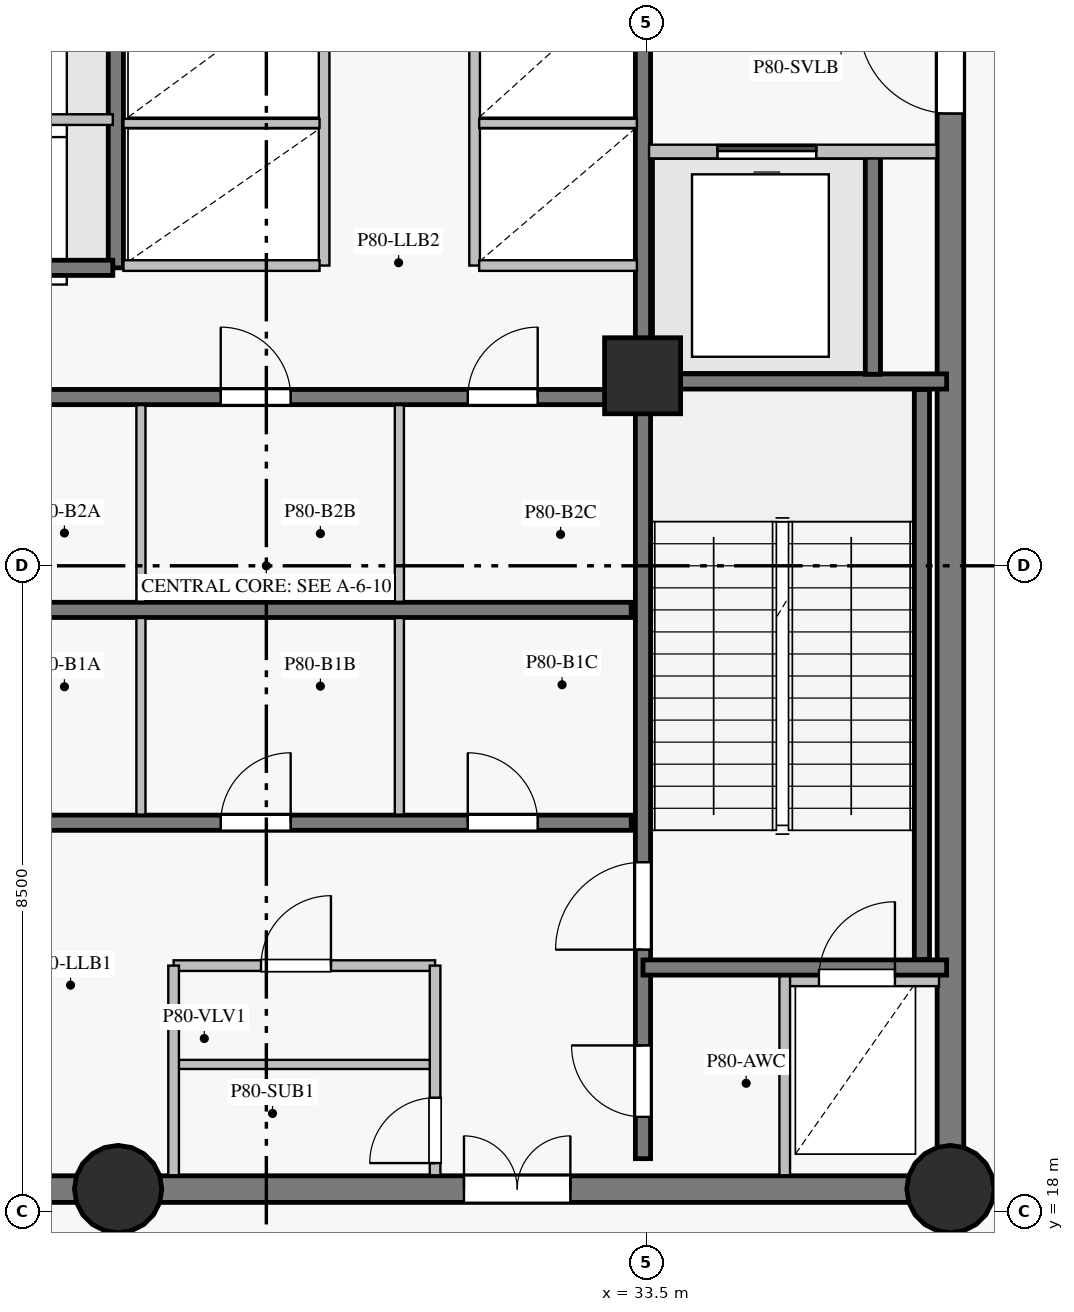
"""IFC4 building model, lengths in metres.
Left out: names, types, materials, properties, quantities, classifications, styles, units other than length and angle.
Written with IfcOpenShell. Run it as: python <this file> out.ifc"""

import sys

from ifc_helpers import new_model, si_unit, direction, frame, frame_2d, origin, origin_with_axes, origin_2d, place, context, subcontext, project, spatial, rectangle, circle, extrude, source, transform, mapped, element, fill, save


model = new_model("IFC4")
c1 = context("Model", 3, precision=1e-05, world=origin(), true_north=direction((0.0, 1.0)))
c2 = subcontext(c1, "Body", "Model", "MODEL_VIEW")
j1 = project(units=[si_unit("LENGTHUNIT", "METRE"), si_unit("PLANEANGLEUNIT", "RADIAN")], contexts=[c1])
p1 = place(None, origin())
s1 = spatial("IfcSite", under=j1, at=p1, CompositionType="ELEMENT")
p2 = place(p1, origin())
s2 = spatial("IfcBuilding", under=s1, at=p2, CompositionType="ELEMENT")
p3 = place(p2, frame((0.0, 0.0, 268.75)))
s3 = spatial("IfcBuildingStorey", under=s2, at=p3, CompositionType="ELEMENT", Elevation=268.75)
p4 = place(p3, frame((19.5, 18.3, 0.0), z_axis=(0.0, 0.0, 1.0), x_axis=(1.0, 0.0, 0.0)))
e1 = element("IfcWall", 1, at=p4, inside=s3, PredefinedType="SHEAR", context=c2, shape_type="SweptSolid", body=[
    extrude(rectangle(XDim=7.05, YDim=0.35, at=frame_2d((3.525, 0.0))), origin(), (0.0, 0.0, 1.0), 4.375),
])
p5 = place(p4, frame((4.2, 0.0, 0.0)))
e2 = element("IfcOpeningElement", 2, at=p5, cuts=e1, PredefinedType="OPENING", context=c2, shape_type="SweptSolid", body=[
    extrude(rectangle(XDim=1.4, YDim=2.2, at=frame_2d((0.7, 1.1))), frame((0.0, 0.185, 0.0), z_axis=(0.0, -1.0, 0.0), x_axis=(1.0, 0.0, 0.0)), (0.0, 0.0, 1.0), 0.37),
])
p6 = place(p3, frame((26.55, 18.3, 0.0), z_axis=(0.0, 0.0, 1.0), x_axis=(1.0, 0.0, 0.0)))
e3 = element("IfcWall", 3, at=p6, inside=s3, PredefinedType="SHEAR", context=c2, shape_type="SweptSolid", body=[
    extrude(rectangle(XDim=10.95, YDim=0.35, at=frame_2d((5.475, 0.0))), origin(), (0.0, 0.0, 1.0), 4.375),
])
p7 = place(p6, frame((4.55, 0.0, 0.0)))
e4 = element("IfcOpeningElement", 4, at=p7, cuts=e3, PredefinedType="OPENING", context=c2, shape_type="SweptSolid", body=[
    extrude(rectangle(XDim=1.4, YDim=2.2, at=frame_2d((0.7, 1.1))), frame((0.0, 0.185, 0.0), z_axis=(0.0, -1.0, 0.0), x_axis=(1.0, 0.0, 0.0)), (0.0, 0.0, 1.0), 0.37),
])
p8 = place(p3, frame((37.5, 18.3, 0.0), z_axis=(0.0, 0.0, 1.0), x_axis=(0.0, 1.0, 0.0)))
e5 = element("IfcWall", 5, at=p8, inside=s3, PredefinedType="SHEAR", context=c2, shape_type="SweptSolid", body=[
    extrude(rectangle(XDim=16.4, YDim=0.35, at=frame_2d((8.2, 0.0))), origin(), (0.0, 0.0, 1.0), 4.375),
])
p9 = place(p8, frame((14.15, 0.0, 0.0)))
e6 = element("IfcOpeningElement", 6, at=p9, cuts=e5, PredefinedType="OPENING", context=c2, shape_type="SweptSolid", body=[
    extrude(rectangle(XDim=1.2, YDim=2.15, at=frame_2d((0.6, 1.075))), frame((0.0, 0.185, 0.0), z_axis=(0.0, -1.0, 0.0), x_axis=(1.0, 0.0, 0.0)), (0.0, 0.0, 1.0), 0.37),
])
m1 = source(origin_with_axes(), c2, "Body", "SweptSolid", [
    extrude(circle(Radius=0.575, at=origin_2d()), origin(), (0.0, 0.0, 1.0), 4.65),
])
for number, where, z_axis, x_axis in (
    (7, (26.55, 18.3, 0.0), (0.0, 0.0, 1.0), (1.0, 0.0, 0.0)),
    (8, (37.5, 18.3, 0.0), (0.0, 0.0, 1.0), (1.0, 0.0, 0.0)),
):
    element("IfcColumn", number, at=place(p3, frame(where, z_axis=z_axis, x_axis=x_axis)), inside=s3, PredefinedType="COLUMN", context=c2, shape_type="MappedRepresentation", body=[
        mapped(m1, transform((0.0, 0.0, 0.0), scale=1.0)),
    ])
m2 = source(origin_with_axes(), c2, "Body", "SweptSolid", [
    extrude(rectangle(XDim=1.0, YDim=1.0, at=origin_2d()), origin(), (0.0, 0.0, 1.0), 4.65),
])
p10 = place(p3, frame((33.45, 29.0, 0.0), z_axis=(0.0, 0.0, 1.0), x_axis=(1.0, 0.0, 0.0)))
e9 = element("IfcColumn", 9, at=p10, inside=s3, PredefinedType="COLUMN", context=c2, shape_type="MappedRepresentation", body=[
    mapped(m2, transform((0.0, 0.0, 0.0), scale=1.0)),
])
p11 = place(p3, frame((35.32, 21.08, 0.0), z_axis=(0.0, 0.0, 1.0), x_axis=(1.0, 0.0, 0.0)))
e10 = element("IfcWall", 10, at=p11, inside=s3, PredefinedType="SHEAR", context=c2, shape_type="SweptSolid", body=[
    extrude(rectangle(XDim=2.03, YDim=0.22, at=frame_2d((1.015, 0.0))), origin(), (0.0, 0.0, 1.0), 2.45),
])
p12 = place(p11, frame((0.45, 0.0, 0.0)))
e11 = element("IfcOpeningElement", 11, at=p12, cuts=e10, PredefinedType="OPENING", context=c2, shape_type="SweptSolid", body=[
    extrude(rectangle(XDim=1.0, YDim=2.05, at=frame_2d((0.5, 1.025))), frame((0.0, 0.12, 0.0), z_axis=(0.0, -1.0, 0.0), x_axis=(1.0, 0.0, 0.0)), (0.0, 0.0, 1.0), 0.24),
])
p13 = place(p3, frame((33.455, 18.7, 0.0), z_axis=(0.0, 0.0, 1.0), x_axis=(0.0, 1.0, 0.0)))
e12 = element("IfcWall", 12, at=p13, inside=s3, PredefinedType="SHEAR", context=c2, shape_type="SweptSolid", body=[
    extrude(rectangle(XDim=15.6, YDim=0.2, at=frame_2d((7.8, 0.0))), origin(), (0.0, 0.0, 1.0), 4.375),
])
p14 = place(p13, frame((2.75, 0.0, 0.0)))
e13 = element("IfcOpeningElement", 13, at=p14, cuts=e12, PredefinedType="OPENING", context=c2, shape_type="SweptSolid", body=[
    extrude(rectangle(XDim=1.15, YDim=2.15, at=frame_2d((0.575, 1.075))), frame((0.0, 0.11, 0.0), z_axis=(0.0, -1.0, 0.0), x_axis=(1.0, 0.0, 0.0)), (0.0, 0.0, 1.0), 0.22),
])
p15 = place(p13, frame((0.55, 0.0, 0.0)))
e14 = element("IfcOpeningElement", 14, at=p15, cuts=e12, PredefinedType="OPENING", context=c2, shape_type="SweptSolid", body=[
    extrude(rectangle(XDim=0.94, YDim=2.1, at=frame_2d((0.47, 1.05))), frame((0.0, 0.11, 0.0), z_axis=(0.0, -1.0, 0.0), x_axis=(1.0, 0.0, 0.0)), (0.0, 0.0, 1.0), 0.22),
])
p16 = place(p3, frame((23.7, 23.12, 0.0), z_axis=(0.0, 0.0, 1.0), x_axis=(1.0, 0.0, 0.0)))
e15 = element("IfcWall", 15, at=p16, inside=s3, PredefinedType="SHEAR", context=c2, shape_type="SweptSolid", body=[
    extrude(rectangle(XDim=9.6, YDim=0.2, at=frame_2d((4.8, 0.0))), origin(), (0.0, 0.0, 1.0), 4.375),
])
p17 = place(p16, frame((0.7, 0.0, 0.0)))
e16 = element("IfcOpeningElement", 16, at=p17, cuts=e15, PredefinedType="OPENING", context=c2, shape_type="SweptSolid", body=[
    extrude(rectangle(XDim=0.92, YDim=2.1, at=frame_2d((0.46, 1.05))), frame((0.0, 0.11, 0.0), z_axis=(0.0, -1.0, 0.0), x_axis=(1.0, 0.0, 0.0)), (0.0, 0.0, 1.0), 0.22),
])
p18 = place(p16, frame((4.2, 0.0, 0.0)))
e17 = element("IfcOpeningElement", 17, at=p18, cuts=e15, PredefinedType="OPENING", context=c2, shape_type="SweptSolid", body=[
    extrude(rectangle(XDim=0.92, YDim=2.1, at=frame_2d((0.46, 1.05))), frame((0.0, 0.11, 0.0), z_axis=(0.0, -1.0, 0.0), x_axis=(1.0, 0.0, 0.0)), (0.0, 0.0, 1.0), 0.22),
])
p19 = place(p16, frame((7.45, 0.0, 0.0)))
e18 = element("IfcOpeningElement", 18, at=p19, cuts=e15, PredefinedType="OPENING", context=c2, shape_type="SweptSolid", body=[
    extrude(rectangle(XDim=0.92, YDim=2.1, at=frame_2d((0.46, 1.05))), frame((0.0, 0.11, 0.0), z_axis=(0.0, -1.0, 0.0), x_axis=(1.0, 0.0, 0.0)), (0.0, 0.0, 1.0), 0.22),
])
p20 = place(p3, frame((23.7, 25.92, 0.0), z_axis=(0.0, 0.0, 1.0), x_axis=(1.0, 0.0, 0.0)))
e19 = element("IfcWall", 19, at=p20, inside=s3, PredefinedType="SHEAR", context=c2, shape_type="SweptSolid", body=[
    extrude(rectangle(XDim=9.6, YDim=0.2, at=frame_2d((4.8, 0.0))), origin(), (0.0, 0.0, 1.0), 4.375),
])
p21 = place(p3, frame((23.7, 28.72, 0.0), z_axis=(0.0, 0.0, 1.0), x_axis=(1.0, 0.0, 0.0)))
e20 = element("IfcWall", 20, at=p21, inside=s3, PredefinedType="SHEAR", context=c2, shape_type="SweptSolid", body=[
    extrude(rectangle(XDim=9.6, YDim=0.2, at=frame_2d((4.8, 0.0))), origin(), (0.0, 0.0, 1.0), 4.375),
])
p22 = place(p21, frame((0.7, 0.0, 0.0)))
e21 = element("IfcOpeningElement", 21, at=p22, cuts=e20, PredefinedType="OPENING", context=c2, shape_type="SweptSolid", body=[
    extrude(rectangle(XDim=0.92, YDim=2.1, at=frame_2d((0.46, 1.05))), frame((0.0, 0.11, 0.0), z_axis=(0.0, -1.0, 0.0), x_axis=(1.0, 0.0, 0.0)), (0.0, 0.0, 1.0), 0.22),
])
p23 = place(p21, frame((4.2, 0.0, 0.0)))
e22 = element("IfcOpeningElement", 22, at=p23, cuts=e20, PredefinedType="OPENING", context=c2, shape_type="SweptSolid", body=[
    extrude(rectangle(XDim=0.92, YDim=2.1, at=frame_2d((0.46, 1.05))), frame((0.0, 0.11, 0.0), z_axis=(0.0, -1.0, 0.0), x_axis=(1.0, 0.0, 0.0)), (0.0, 0.0, 1.0), 0.22),
])
p24 = place(p21, frame((7.45, 0.0, 0.0)))
e23 = element("IfcOpeningElement", 23, at=p24, cuts=e20, PredefinedType="OPENING", context=c2, shape_type="SweptSolid", body=[
    extrude(rectangle(XDim=0.92, YDim=2.1, at=frame_2d((0.46, 1.05))), frame((0.0, 0.11, 0.0), z_axis=(0.0, -1.0, 0.0), x_axis=(1.0, 0.0, 0.0)), (0.0, 0.0, 1.0), 0.22),
])
p25 = place(p3, frame((37.125, 21.32, 0.0), z_axis=(0.0, 0.0, 1.0), x_axis=(0.0, 1.0, 0.0)))
e24 = element("IfcWall", 24, at=p25, inside=s3, PredefinedType="SHEAR", context=c2, shape_type="SweptSolid", body=[
    extrude(rectangle(XDim=7.5, YDim=0.2, at=frame_2d((3.75, 0.0))), origin(), (0.0, 0.0, 1.0), 4.375),
])
for number, where, z_axis, x_axis in (
    (25, (33.455, 21.215, 0.0), (0.0, 0.0, 1.0), (1.0, 0.0, 0.0)),
    (26, (33.455, 28.925, 0.0), (0.0, 0.0, 1.0), (1.0, 0.0, 0.0)),
):
    element("IfcWall", number, at=place(p3, frame(where, z_axis=z_axis, x_axis=x_axis)), inside=s3, PredefinedType="SHEAR", context=c2, shape_type="SweptSolid", body=[
        extrude(rectangle(XDim=3.995, YDim=0.2, at=frame_2d((1.998, 0.0))), origin(), (0.0, 0.0, 1.0), 4.375),
    ])
p26 = place(p3, frame((26.52, 30.42, 0.0), z_axis=(0.0, 0.0, 1.0), x_axis=(0.0, 1.0, 0.0)))
e27 = element("IfcWall", 27, at=p26, inside=s3, PredefinedType="SHEAR", context=c2, shape_type="SweptSolid", body=[
    extrude(rectangle(XDim=3.86, YDim=0.2, at=frame_2d((1.93, 0.0))), origin(), (0.0, 0.0, 1.0), 4.375),
])
p27 = place(p3, frame((36.48, 29.02, 0.0), z_axis=(0.0, 0.0, 1.0), x_axis=(0.0, 1.0, 0.0)))
e28 = element("IfcWall", 28, at=p27, inside=s3, PredefinedType="SHEAR", context=c2, shape_type="SweptSolid", body=[
    extrude(rectangle(XDim=2.86, YDim=0.2, at=frame_2d((1.43, 0.0))), origin(), (0.0, 0.0, 1.0), 4.375),
])
p28 = place(p3, frame((23.7, 30.42, 0.0), z_axis=(0.0, 0.0, 1.0), x_axis=(1.0, 0.0, 0.0)))
e29 = element("IfcWall", 29, at=p28, inside=s3, PredefinedType="SHEAR", context=c2, shape_type="SweptSolid", body=[
    extrude(rectangle(XDim=2.78, YDim=0.2, at=frame_2d((1.39, 0.0))), origin(), (0.0, 0.0, 1.0), 4.375),
])
for number, where, z_axis, x_axis in (
    (30, (29.26, 30.45, 0.0), (0.0, 0.0, 1.0), (0.0, 1.0, 0.0)),
    (31, (31.24, 30.45, 0.0), (0.0, 0.0, 1.0), (0.0, 1.0, 0.0)),
):
    element("IfcWall", number, at=place(p3, frame(where, z_axis=z_axis, x_axis=x_axis)), inside=s3, PredefinedType="PARTITIONING", context=c2, shape_type="SweptSolid", body=[
        extrude(rectangle(XDim=4.068, YDim=0.14, at=frame_2d((2.034, 0.0))), origin(), (0.0, 0.0, 1.0), 4.375),
    ])
p29 = place(p3, frame((33.535, 31.95, 0.0), z_axis=(0.0, 0.0, 1.0), x_axis=(1.0, 0.0, 0.0)))
e32 = element("IfcWall", 32, at=p29, inside=s3, PredefinedType="PARTITIONING", context=c2, shape_type="SweptSolid", body=[
    extrude(rectangle(XDim=3.784, YDim=0.18, at=frame_2d((1.892, 0.0))), origin(), (0.0, 0.0, 1.0), 4.375),
])
p30 = place(p29, frame((0.9, 0.0, 0.0)))
e33 = element("IfcOpeningElement", 33, at=p30, cuts=e32, PredefinedType="OPENING", context=c2, shape_type="SweptSolid", body=[
    extrude(rectangle(XDim=1.3, YDim=2.2, at=frame_2d((0.65, 1.1))), frame((0.0, 0.1, 0.0), z_axis=(0.0, -1.0, 0.0), x_axis=(1.0, 0.0, 0.0)), (0.0, 0.0, 1.0), 0.2),
])
p31 = place(p3, frame((27.28, 21.24, 0.0), z_axis=(0.0, 0.0, 1.0), x_axis=(1.0, 0.0, 0.0)))
e34 = element("IfcWall", 34, at=p31, inside=s3, PredefinedType="PARTITIONING", context=c2, shape_type="SweptSolid", body=[
    extrude(rectangle(XDim=3.44, YDim=0.14, at=frame_2d((1.72, 0.0))), origin(), (0.0, 0.0, 1.0), 4.375),
])
p32 = place(p31, frame((1.15, 0.0, 0.0)))
e35 = element("IfcOpeningElement", 35, at=p32, cuts=e34, PredefinedType="OPENING", context=c2, shape_type="SweptSolid", body=[
    extrude(rectangle(XDim=0.92, YDim=2.1, at=frame_2d((0.46, 1.05))), frame((0.0, 0.08, 0.0), z_axis=(0.0, -1.0, 0.0), x_axis=(1.0, 0.0, 0.0)), (0.0, 0.0, 1.0), 0.16),
])
p33 = place(p3, frame((27.28, 19.94, 0.0), z_axis=(0.0, 0.0, 1.0), x_axis=(1.0, 0.0, 0.0)))
e36 = element("IfcWall", 36, at=p33, inside=s3, PredefinedType="PARTITIONING", context=c2, shape_type="SweptSolid", body=[
    extrude(rectangle(XDim=3.44, YDim=0.12, at=frame_2d((1.72, 0.0))), origin(), (0.0, 0.0, 1.0), 4.375),
])
p34 = place(p3, frame((23.652, 32.37, 0.0), z_axis=(0.0, 0.0, 1.0), x_axis=(1.0, 0.0, 0.0)))
e37 = element("IfcWall", 37, at=p34, inside=s3, PredefinedType="PARTITIONING", context=c2, shape_type="SweptSolid", body=[
    extrude(rectangle(XDim=2.828, YDim=0.14, at=frame_2d((1.414, 0.0))), origin(), (0.0, 0.0, 1.0), 4.375),
])
p35 = place(p3, frame((27.28, 18.482, 0.0), z_axis=(0.0, 0.0, 1.0), x_axis=(0.0, 1.0, 0.0)))
e38 = element("IfcWall", 38, at=p35, inside=s3, PredefinedType="PARTITIONING", context=c2, shape_type="SweptSolid", body=[
    extrude(rectangle(XDim=2.758, YDim=0.14, at=frame_2d((1.379, 0.0))), origin(), (0.0, 0.0, 1.0), 4.375),
])
p36 = place(p3, frame((30.72, 18.482, 0.0), z_axis=(0.0, 0.0, 1.0), x_axis=(0.0, 1.0, 0.0)))
e39 = element("IfcWall", 39, at=p36, inside=s3, PredefinedType="PARTITIONING", context=c2, shape_type="SweptSolid", body=[
    extrude(rectangle(XDim=2.758, YDim=0.14, at=frame_2d((1.379, 0.0))), origin(), (0.0, 0.0, 1.0), 4.375),
])
p37 = place(p36, frame((0.16, 0.0, 0.0)))
e40 = element("IfcOpeningElement", 40, at=p37, cuts=e39, PredefinedType="OPENING", context=c2, shape_type="SweptSolid", body=[
    extrude(rectangle(XDim=0.86, YDim=2.1, at=frame_2d((0.43, 1.05))), frame((0.0, 0.08, 0.0), z_axis=(0.0, -1.0, 0.0), x_axis=(1.0, 0.0, 0.0)), (0.0, 0.0, 1.0), 0.16),
])
p38 = place(p3, frame((26.62, 30.45, 0.0), z_axis=(0.0, 0.0, 1.0), x_axis=(1.0, 0.0, 0.0)))
e41 = element("IfcWall", 41, at=p38, inside=s3, PredefinedType="PARTITIONING", context=c2, shape_type="SweptSolid", body=[
    extrude(rectangle(XDim=2.58, YDim=0.14, at=frame_2d((1.29, 0.0))), origin(), (0.0, 0.0, 1.0), 4.375),
])
p39 = place(p3, frame((26.62, 32.32, 0.0), z_axis=(0.0, 0.0, 1.0), x_axis=(1.0, 0.0, 0.0)))
e42 = element("IfcWall", 42, at=p39, inside=s3, PredefinedType="PARTITIONING", context=c2, shape_type="SweptSolid", body=[
    extrude(rectangle(XDim=2.58, YDim=0.12, at=frame_2d((1.29, 0.0))), origin(), (0.0, 0.0, 1.0), 4.375),
])
for number, where, z_axis, x_axis in (
    (43, (26.85, 23.227, 0.0), (0.0, 0.0, 1.0), (0.0, 1.0, 0.0)),
    (44, (30.25, 23.227, 0.0), (0.0, 0.0, 1.0), (0.0, 1.0, 0.0)),
    (45, (26.85, 26.027, 0.0), (0.0, 0.0, 1.0), (0.0, 1.0, 0.0)),
    (46, (30.25, 26.027, 0.0), (0.0, 0.0, 1.0), (0.0, 1.0, 0.0)),
):
    element("IfcWall", number, at=place(p3, frame(where, z_axis=z_axis, x_axis=x_axis)), inside=s3, PredefinedType="PARTITIONING", context=c2, shape_type="SweptSolid", body=[
        extrude(rectangle(XDim=2.587, YDim=0.12, at=frame_2d((1.293, 0.0))), origin(), (0.0, 0.0, 1.0), 4.375),
    ])
p40 = place(p3, frame((35.32, 18.482, 0.0), z_axis=(0.0, 0.0, 1.0), x_axis=(0.0, 1.0, 0.0)))
e47 = element("IfcWall", 47, at=p40, inside=s3, PredefinedType="PARTITIONING", context=c2, shape_type="SweptSolid", body=[
    extrude(rectangle(XDim=2.617, YDim=0.14, at=frame_2d((1.309, 0.0))), origin(), (0.0, 0.0, 1.0), 4.375),
])
p41 = place(p3, frame((31.3, 30.45, 0.0), z_axis=(0.0, 0.0, 1.0), x_axis=(1.0, 0.0, 0.0)))
e48 = element("IfcWall", 48, at=p41, inside=s3, PredefinedType="PARTITIONING", context=c2, shape_type="SweptSolid", body=[
    extrude(rectangle(XDim=2.075, YDim=0.14, at=frame_2d((1.038, 0.0))), origin(), (0.0, 0.0, 1.0), 4.375),
])
p42 = place(p3, frame((31.3, 32.32, 0.0), z_axis=(0.0, 0.0, 1.0), x_axis=(1.0, 0.0, 0.0)))
e49 = element("IfcWall", 49, at=p42, inside=s3, PredefinedType="PARTITIONING", context=c2, shape_type="SweptSolid", body=[
    extrude(rectangle(XDim=2.075, YDim=0.12, at=frame_2d((1.038, 0.0))), origin(), (0.0, 0.0, 1.0), 4.375),
])
m3 = source(origin_with_axes(), c2, "Body", "SweptSolid", [
    extrude(rectangle(XDim=1.0, YDim=2.05, at=frame_2d((0.5, 1.025))), frame((0.0, 0.025, 0.0), z_axis=(0.0, -1.0, 0.0), x_axis=(1.0, 0.0, 0.0)), (0.0, 0.0, 1.0), 0.05),
])
p43 = place(p12, origin())
e50 = element("IfcDoor", 50, at=p43, inside=s3, OperationType="SINGLE_SWING_RIGHT", PredefinedType="TRAPDOOR", context=c2, shape_type="MappedRepresentation", body=[
    mapped(m3, transform((0.0, 0.0, 0.0), scale=1.0)),
])
fill(e11, e50)
m4 = source(origin_with_axes(), c2, "Body", "SweptSolid", [
    extrude(rectangle(XDim=1.15, YDim=2.15, at=frame_2d((0.575, 1.075))), frame((0.0, 0.025, 0.0), z_axis=(0.0, -1.0, 0.0), x_axis=(1.0, 0.0, 0.0)), (0.0, 0.0, 1.0), 0.05),
])
p44 = place(p14, origin())
e51 = element("IfcDoor", 51, at=p44, inside=s3, OperationType="SINGLE_SWING_LEFT", PredefinedType="DOOR", context=c2, shape_type="MappedRepresentation", body=[
    mapped(m4, transform((0.0, 0.0, 0.0), scale=1.0)),
])
fill(e13, e51)
m5 = source(origin_with_axes(), c2, "Body", "SweptSolid", [
    extrude(rectangle(XDim=1.2, YDim=2.15, at=frame_2d((0.6, 1.075))), frame((0.0, 0.025, 0.0), z_axis=(0.0, -1.0, 0.0), x_axis=(1.0, 0.0, 0.0)), (0.0, 0.0, 1.0), 0.05),
])
p45 = place(p9, origin())
e52 = element("IfcDoor", 52, at=p45, inside=s3, OperationType="SINGLE_SWING_RIGHT", PredefinedType="DOOR", context=c2, shape_type="MappedRepresentation", body=[
    mapped(m5, transform((0.0, 0.0, 0.0), scale=1.0)),
])
fill(e6, e52)
m6 = source(origin_with_axes(), c2, "Body", "SweptSolid", [
    extrude(rectangle(XDim=1.3, YDim=2.2, at=frame_2d((0.65, 1.1))), frame((0.0, 0.025, 0.0), z_axis=(0.0, -1.0, 0.0), x_axis=(1.0, 0.0, 0.0)), (0.0, 0.0, 1.0), 0.05),
])
p46 = place(p30, origin())
e53 = element("IfcDoor", 53, at=p46, inside=s3, OperationType="SLIDING_TO_LEFT", PredefinedType="DOOR", context=c2, shape_type="MappedRepresentation", body=[
    mapped(m6, transform((0.0, 0.0, 0.0), scale=1.0)),
])
fill(e33, e53)
m7 = source(origin_with_axes(), c2, "Body", "SweptSolid", [
    extrude(rectangle(XDim=1.4, YDim=2.2, at=frame_2d((0.7, 1.1))), frame((0.0, 0.025, 0.0), z_axis=(0.0, -1.0, 0.0), x_axis=(1.0, 0.0, 0.0)), (0.0, 0.0, 1.0), 0.05),
])
p47 = place(p7, origin())
e54 = element("IfcDoor", 54, at=p47, inside=s3, OperationType="DOUBLE_DOOR_SINGLE_SWING", PredefinedType="DOOR", context=c2, shape_type="MappedRepresentation", body=[
    mapped(m7, transform((0.0, 0.0, 0.0), scale=1.0)),
])
fill(e4, e54)
m8 = source(origin_with_axes(), c2, "Body", "SweptSolid", [
    extrude(rectangle(XDim=0.94, YDim=2.1, at=frame_2d((0.47, 1.05))), frame((0.0, 0.025, 0.0), z_axis=(0.0, -1.0, 0.0), x_axis=(1.0, 0.0, 0.0)), (0.0, 0.0, 1.0), 0.05),
])
p48 = place(p15, origin())
e55 = element("IfcDoor", 55, at=p48, inside=s3, OperationType="SINGLE_SWING_RIGHT", PredefinedType="DOOR", context=c2, shape_type="MappedRepresentation", body=[
    mapped(m8, transform((0.0, 0.0, 0.0), scale=1.0)),
])
fill(e14, e55)
m9 = source(origin_with_axes(), c2, "Body", "SweptSolid", [
    extrude(rectangle(XDim=0.86, YDim=2.1, at=frame_2d((0.43, 1.05))), frame((0.0, 0.025, 0.0), z_axis=(0.0, -1.0, 0.0), x_axis=(1.0, 0.0, 0.0)), (0.0, 0.0, 1.0), 0.05),
])
p49 = place(p37, origin())
e56 = element("IfcDoor", 56, at=p49, inside=s3, OperationType="SINGLE_SWING_LEFT", PredefinedType="DOOR", context=c2, shape_type="MappedRepresentation", body=[
    mapped(m9, transform((0.0, 0.0, 0.0), scale=1.0)),
])
fill(e40, e56)
m10 = source(origin_with_axes(), c2, "Body", "SweptSolid", [
    extrude(rectangle(XDim=0.92, YDim=2.1, at=frame_2d((0.46, 1.05))), frame((0.0, 0.025, 0.0), z_axis=(0.0, -1.0, 0.0), x_axis=(1.0, 0.0, 0.0)), (0.0, 0.0, 1.0), 0.05),
])
p50 = place(p32, origin())
e57 = element("IfcDoor", 57, at=p50, inside=s3, OperationType="SINGLE_SWING_RIGHT", PredefinedType="DOOR", context=c2, shape_type="MappedRepresentation", body=[
    mapped(m10, transform((0.0, 0.0, 0.0), scale=1.0)),
])
fill(e35, e57)
p51 = place(p18, origin())
e58 = element("IfcDoor", 58, at=p51, inside=s3, OperationType="SINGLE_SWING_RIGHT", PredefinedType="DOOR", context=c2, shape_type="MappedRepresentation", body=[
    mapped(m10, transform((0.0, 0.0, 0.0), scale=1.0)),
])
fill(e17, e58)
p52 = place(p19, origin())
e59 = element("IfcDoor", 59, at=p52, inside=s3, OperationType="SINGLE_SWING_LEFT", PredefinedType="DOOR", context=c2, shape_type="MappedRepresentation", body=[
    mapped(m10, transform((0.0, 0.0, 0.0), scale=1.0)),
])
fill(e18, e59)
p53 = place(p23, origin())
e60 = element("IfcDoor", 60, at=p53, inside=s3, OperationType="SINGLE_SWING_LEFT", PredefinedType="DOOR", context=c2, shape_type="MappedRepresentation", body=[
    mapped(m10, transform((0.0, 0.0, 0.0), scale=1.0)),
])
fill(e22, e60)
p54 = place(p24, origin())
e61 = element("IfcDoor", 61, at=p54, inside=s3, OperationType="SINGLE_SWING_RIGHT", PredefinedType="DOOR", context=c2, shape_type="MappedRepresentation", body=[
    mapped(m10, transform((0.0, 0.0, 0.0), scale=1.0)),
])
fill(e23, e61)
save(model, sys.argv[1])
